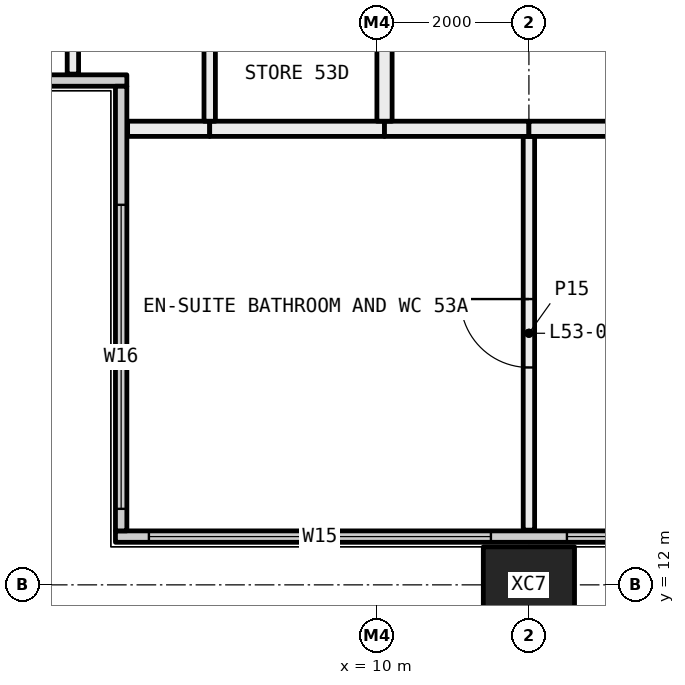
"""IFC4 building model, lengths in metres.
Left out: names, types, materials, properties, quantities, classifications, styles, units other than length and angle.
Written with IfcOpenShell. Run it as: python <this file> out.ifc"""

import sys

from ifc_helpers import new_model, si_unit, direction, frame, frame_2d, origin, origin_2d, place, context, subcontext, project, spatial, rectangle, hollow_rectangle, extrude, element, fill, save


model = new_model("IFC4")
c1 = context("Model", 3, precision=1e-05, world=origin(), true_north=direction((0.0, 1.0)))
c2 = subcontext(c1, "Body", "Model", "MODEL_VIEW")
j1 = project(units=[si_unit("LENGTHUNIT", "METRE"), si_unit("PLANEANGLEUNIT", "RADIAN")], contexts=[c1])
p1 = place(None, origin())
s1 = spatial("IfcSite", under=j1, at=p1, CompositionType="ELEMENT")
p2 = place(p1, origin())
s2 = spatial("IfcBuilding", under=s1, at=p2, CompositionType="ELEMENT")
p3 = place(p2, frame((0.0, 0.0, 199.65)))
s3 = spatial("IfcBuildingStorey", under=s2, at=p3, CompositionType="ELEMENT", Elevation=199.65)
p4 = place(p3, frame((12.0, 12.0, -0.4), z_axis=(0.0, 0.0, 1.0), x_axis=(1.0, 0.0, 0.0)))
e1 = element("IfcColumn", 1, at=p4, inside=s3, PredefinedType="COLUMN", context=c2, shape_type="SweptSolid", body=[
    extrude(hollow_rectangle(XDim=1.2, YDim=1.0, WallThickness=0.045, at=origin_2d()), origin(), (0.0, 0.0, 1.0), 3.45),
])
p5 = place(p3, frame((6.56, 12.635, 0.0), z_axis=(0.0, 0.0, 1.0), x_axis=(1.0, 0.0, 0.0)))
e2 = element("IfcWall", 2, at=p5, inside=s3, PredefinedType="ELEMENTEDWALL", context=c2, shape_type="SweptSolid", body=[
    extrude(rectangle(XDim=46.88, YDim=0.15, at=frame_2d((23.44, 0.0))), origin(), (0.0, 0.0, 1.0), 3.05),
])
p6 = place(p5, frame((0.44, 0.0, 0.45)))
e3 = element("IfcOpeningElement", 3, at=p6, cuts=e2, PredefinedType="OPENING", context=c2, shape_type="SweptSolid", body=[
    extrude(rectangle(XDim=4.5, YDim=2.55, at=frame_2d((2.25, 1.275))), frame((0.0, 0.085, 0.0), z_axis=(0.0, -1.0, 0.0), x_axis=(1.0, 0.0, 0.0)), (0.0, 0.0, 1.0), 0.17),
])
p7 = place(p5, frame((5.94, 0.0, 0.45)))
e4 = element("IfcOpeningElement", 4, at=p7, cuts=e2, PredefinedType="OPENING", context=c2, shape_type="SweptSolid", body=[
    extrude(rectangle(XDim=3.25, YDim=2.55, at=frame_2d((1.625, 1.275))), frame((0.0, 0.085, 0.0), z_axis=(0.0, -1.0, 0.0), x_axis=(1.0, 0.0, 0.0)), (0.0, 0.0, 1.0), 0.17),
])
p8 = place(p5, frame((13.69, 0.0, 0.45)))
e5 = element("IfcOpeningElement", 5, at=p8, cuts=e2, PredefinedType="OPENING", context=c2, shape_type="SweptSolid", body=[
    extrude(rectangle(XDim=3.25, YDim=2.55, at=frame_2d((1.625, 1.275))), frame((0.0, 0.085, 0.0), z_axis=(0.0, -1.0, 0.0), x_axis=(1.0, 0.0, 0.0)), (0.0, 0.0, 1.0), 0.17),
])
p9 = place(p5, frame((17.94, 0.0, 0.45)))
e6 = element("IfcOpeningElement", 6, at=p9, cuts=e2, PredefinedType="OPENING", context=c2, shape_type="SweptSolid", body=[
    extrude(rectangle(XDim=3.25, YDim=2.55, at=frame_2d((1.625, 1.275))), frame((0.0, 0.085, 0.0), z_axis=(0.0, -1.0, 0.0), x_axis=(1.0, 0.0, 0.0)), (0.0, 0.0, 1.0), 0.17),
])
p10 = place(p5, frame((26.94, 0.0, 0.45)))
e7 = element("IfcOpeningElement", 7, at=p10, cuts=e2, PredefinedType="OPENING", context=c2, shape_type="SweptSolid", body=[
    extrude(rectangle(XDim=2.0, YDim=2.55, at=frame_2d((1.0, 1.275))), frame((0.0, 0.085, 0.0), z_axis=(0.0, -1.0, 0.0), x_axis=(1.0, 0.0, 0.0)), (0.0, 0.0, 1.0), 0.17),
])
p11 = place(p5, frame((29.94, 0.0, 0.45)))
e8 = element("IfcOpeningElement", 8, at=p11, cuts=e2, PredefinedType="OPENING", context=c2, shape_type="SweptSolid", body=[
    extrude(rectangle(XDim=3.25, YDim=2.55, at=frame_2d((1.625, 1.275))), frame((0.0, 0.085, 0.0), z_axis=(0.0, -1.0, 0.0), x_axis=(1.0, 0.0, 0.0)), (0.0, 0.0, 1.0), 0.17),
])
p12 = place(p5, frame((37.69, 0.0, 0.45)))
e9 = element("IfcOpeningElement", 9, at=p12, cuts=e2, PredefinedType="OPENING", context=c2, shape_type="SweptSolid", body=[
    extrude(rectangle(XDim=3.25, YDim=2.55, at=frame_2d((1.625, 1.275))), frame((0.0, 0.085, 0.0), z_axis=(0.0, -1.0, 0.0), x_axis=(1.0, 0.0, 0.0)), (0.0, 0.0, 1.0), 0.17),
])
p13 = place(p5, frame((41.94, 0.0, 0.45)))
e10 = element("IfcOpeningElement", 10, at=p13, cuts=e2, PredefinedType="OPENING", context=c2, shape_type="SweptSolid", body=[
    extrude(rectangle(XDim=4.5, YDim=2.55, at=frame_2d((2.25, 1.275))), frame((0.0, 0.085, 0.0), z_axis=(0.0, -1.0, 0.0), x_axis=(1.0, 0.0, 0.0)), (0.0, 0.0, 1.0), 0.17),
])
p14 = place(p3, frame((0.56, 18.635, 0.0), z_axis=(0.0, 0.0, 1.0), x_axis=(1.0, 0.0, 0.0)))
e11 = element("IfcWall", 11, at=p14, inside=s3, PredefinedType="ELEMENTEDWALL", context=c2, shape_type="SweptSolid", body=[
    extrude(rectangle(XDim=6.15, YDim=0.15, at=frame_2d((3.075, 0.0))), origin(), (0.0, 0.0, 1.0), 3.05),
])
p15 = place(p14, frame((0.44, 0.0, 0.45)))
e12 = element("IfcOpeningElement", 12, at=p15, cuts=e11, PredefinedType="OPENING", context=c2, shape_type="SweptSolid", body=[
    extrude(rectangle(XDim=4.0, YDim=2.55, at=frame_2d((2.0, 1.275))), frame((0.0, 0.085, 0.0), z_axis=(0.0, -1.0, 0.0), x_axis=(1.0, 0.0, 0.0)), (0.0, 0.0, 1.0), 0.17),
])
p16 = place(p3, frame((6.635, 12.71, 0.0), z_axis=(0.0, 0.0, 1.0), x_axis=(0.0, 1.0, 0.0)))
e13 = element("IfcWall", 13, at=p16, inside=s3, PredefinedType="ELEMENTEDWALL", context=c2, shape_type="SweptSolid", body=[
    extrude(rectangle(XDim=5.85, YDim=0.15, at=frame_2d((2.925, 0.0))), origin(), (0.0, 0.0, 1.0), 3.05),
])
p17 = place(p16, frame((0.29, 0.0, 0.45)))
e14 = element("IfcOpeningElement", 14, at=p17, cuts=e13, PredefinedType="OPENING", context=c2, shape_type="SweptSolid", body=[
    extrude(rectangle(XDim=4.0, YDim=2.55, at=frame_2d((2.0, 1.275))), frame((0.0, 0.085, 0.0), z_axis=(0.0, -1.0, 0.0), x_axis=(1.0, 0.0, 0.0)), (0.0, 0.0, 1.0), 0.17),
])
p18 = place(p3, frame((12.0, 12.72, 0.0), z_axis=(0.0, 0.0, 1.0), x_axis=(0.0, 1.0, 0.0)))
e15 = element("IfcWall", 15, at=p18, inside=s3, PredefinedType="PARTITIONING", context=c2, shape_type="SweptSolid", body=[
    extrude(rectangle(XDim=5.18, YDim=0.15, at=frame_2d((2.59, 0.0))), origin(), (0.0, 0.0, 1.0), 3.05),
])
p19 = place(p18, frame((2.14, 0.0, 0.0)))
e16 = element("IfcOpeningElement", 16, at=p19, cuts=e15, PredefinedType="OPENING", context=c2, shape_type="SweptSolid", body=[
    extrude(rectangle(XDim=0.9, YDim=2.1, at=frame_2d((0.45, 1.05))), frame((0.0, 0.085, 0.0), z_axis=(0.0, -1.0, 0.0), x_axis=(1.0, 0.0, 0.0)), (0.0, 0.0, 1.0), 0.17),
])
p20 = place(p3, frame((7.8, 18.0, 0.0), z_axis=(0.0, 0.0, 1.0), x_axis=(-1.0, 0.0, 0.0)))
e17 = element("IfcWall", 17, at=p20, inside=s3, PredefinedType="PARTITIONING", context=c2, shape_type="SweptSolid", body=[
    extrude(rectangle(XDim=1.08, YDim=0.2, at=frame_2d((0.54, 0.0))), origin(), (0.0, 0.0, 1.0), 3.05),
])
p21 = place(p3, frame((10.1, 18.0, 0.0), z_axis=(0.0, 0.0, 1.0), x_axis=(-1.0, 0.0, 0.0)))
e18 = element("IfcWall", 18, at=p21, inside=s3, PredefinedType="PARTITIONING", context=c2, shape_type="SweptSolid", body=[
    extrude(rectangle(XDim=2.3, YDim=0.2, at=frame_2d((1.15, 0.0))), origin(), (0.0, 0.0, 1.0), 3.05),
])
p22 = place(p3, frame((12.0, 18.0, 0.0), z_axis=(0.0, 0.0, 1.0), x_axis=(-1.0, 0.0, 0.0)))
e19 = element("IfcWall", 19, at=p22, inside=s3, PredefinedType="PARTITIONING", context=c2, shape_type="SweptSolid", body=[
    extrude(rectangle(XDim=1.9, YDim=0.2, at=frame_2d((0.95, 0.0))), origin(), (0.0, 0.0, 1.0), 3.05),
])
p23 = place(p3, frame((18.0, 18.0, 0.0), z_axis=(0.0, 0.0, 1.0), x_axis=(-1.0, 0.0, 0.0)))
e20 = element("IfcWall", 20, at=p23, inside=s3, PredefinedType="PARTITIONING", context=c2, shape_type="SweptSolid", body=[
    extrude(rectangle(XDim=6.0, YDim=0.2, at=frame_2d((3.0, 0.0))), origin(), (0.0, 0.0, 1.0), 3.05),
])
p24 = place(p3, frame((6.0, 18.72, 0.0), z_axis=(0.0, 0.0, 1.0), x_axis=(0.0, 1.0, 0.0)))
e21 = element("IfcWall", 21, at=p24, inside=s3, PredefinedType="PARTITIONING", context=c2, shape_type="SweptSolid", body=[
    extrude(rectangle(XDim=2.28, YDim=0.15, at=frame_2d((1.14, 0.0))), origin(), (0.0, 0.0, 1.0), 3.05),
])
p25 = place(p24, frame((0.69, 0.0, 0.0)))
e22 = element("IfcOpeningElement", 22, at=p25, cuts=e21, PredefinedType="OPENING", context=c2, shape_type="SweptSolid", body=[
    extrude(rectangle(XDim=0.9, YDim=2.1, at=frame_2d((0.45, 1.05))), frame((0.0, 0.085, 0.0), z_axis=(0.0, -1.0, 0.0), x_axis=(1.0, 0.0, 0.0)), (0.0, 0.0, 1.0), 0.17),
])
p26 = place(p3, frame((7.8, 18.1, 0.0), z_axis=(0.0, 0.0, 1.0), x_axis=(0.0, 1.0, 0.0)))
e23 = element("IfcWall", 23, at=p26, inside=s3, PredefinedType="PARTITIONING", context=c2, shape_type="SweptSolid", body=[
    extrude(rectangle(XDim=2.9, YDim=0.15, at=frame_2d((1.45, 0.0))), origin(), (0.0, 0.0, 1.0), 3.05),
])
p27 = place(p3, frame((10.1, 18.1, 0.0), z_axis=(0.0, 0.0, 1.0), x_axis=(0.0, 1.0, 0.0)))
e24 = element("IfcWall", 24, at=p27, inside=s3, PredefinedType="PARTITIONING", context=c2, shape_type="SweptSolid", body=[
    extrude(rectangle(XDim=2.9, YDim=0.2, at=frame_2d((1.45, 0.0))), origin(), (0.0, 0.0, 1.0), 3.05),
])
p28 = place(p6, origin())
e25 = element("IfcWindow", 25, at=p28, inside=s3, PartitioningType="SINGLE_PANEL", PredefinedType="WINDOW", context=c2, shape_type="SweptSolid", body=[
    extrude(rectangle(XDim=4.5, YDim=2.55, at=frame_2d((2.25, 1.275))), frame((0.0, 0.03, 0.0), z_axis=(0.0, -1.0, 0.0), x_axis=(1.0, 0.0, 0.0)), (0.0, 0.0, 1.0), 0.06),
])
fill(e3, e25)
p29 = place(p7, origin())
e26 = element("IfcWindow", 26, at=p29, inside=s3, PartitioningType="SINGLE_PANEL", PredefinedType="WINDOW", context=c2, shape_type="SweptSolid", body=[
    extrude(rectangle(XDim=3.25, YDim=2.55, at=frame_2d((1.625, 1.275))), frame((0.0, 0.03, 0.0), z_axis=(0.0, -1.0, 0.0), x_axis=(1.0, 0.0, 0.0)), (0.0, 0.0, 1.0), 0.06),
])
fill(e4, e26)
p30 = place(p17, origin())
e27 = element("IfcWindow", 27, at=p30, inside=s3, PartitioningType="SINGLE_PANEL", PredefinedType="WINDOW", context=c2, shape_type="SweptSolid", body=[
    extrude(rectangle(XDim=4.0, YDim=2.55, at=frame_2d((2.0, 1.275))), frame((0.0, 0.03, 0.0), z_axis=(0.0, -1.0, 0.0), x_axis=(1.0, 0.0, 0.0)), (0.0, 0.0, 1.0), 0.06),
])
fill(e14, e27)
p31 = place(p19, origin())
e28 = element("IfcDoor", 28, at=p31, inside=s3, OperationType="SINGLE_SWING_LEFT", PredefinedType="DOOR", context=c2, shape_type="SweptSolid", body=[
    extrude(rectangle(XDim=0.9, YDim=2.1, at=frame_2d((0.45, 1.05))), frame((0.0, 0.025, 0.0), z_axis=(0.0, -1.0, 0.0), x_axis=(1.0, 0.0, 0.0)), (0.0, 0.0, 1.0), 0.05),
])
fill(e16, e28)
save(model, sys.argv[1])
